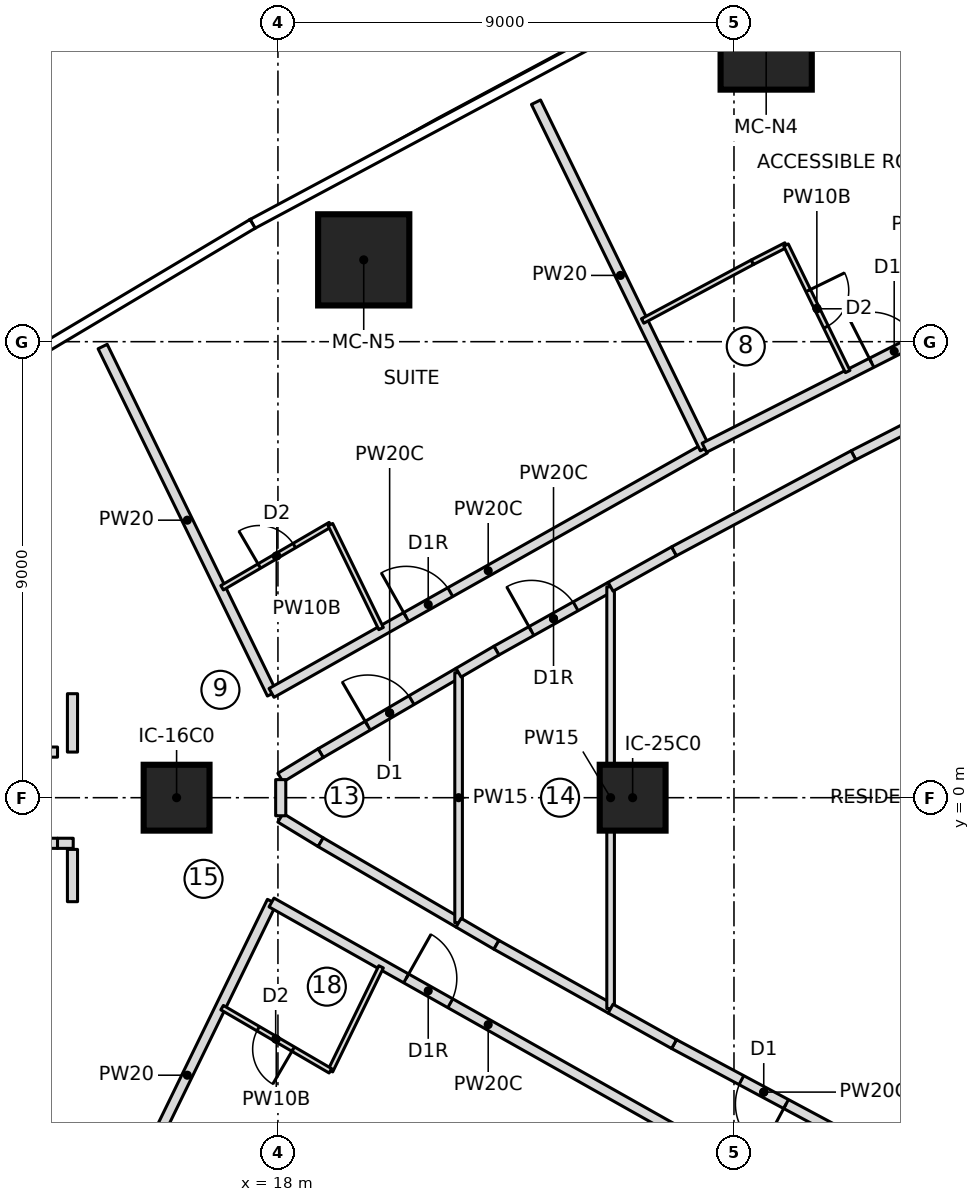
"""IFC4 building model, lengths in metres.
Left out: names, types, materials, properties, quantities, classifications, styles, units other than length and angle.
Written with IfcOpenShell. Run it as: python <this file> out.ifc"""

import sys

from ifc_helpers import new_model, si_unit, direction, frame, frame_2d, origin, origin_2d, place, context, subcontext, project, spatial, rectangle, extrude, element, fill, save


model = new_model("IFC4")
c1 = context("Model", 3, precision=1e-05, world=origin(), true_north=direction((0.0, 1.0)))
c2 = subcontext(c1, "Body", "Model", "MODEL_VIEW")
j1 = project(units=[si_unit("LENGTHUNIT", "METRE"), si_unit("PLANEANGLEUNIT", "RADIAN")], contexts=[c1])
p1 = place(None, origin())
s1 = spatial("IfcSite", under=j1, at=p1, CompositionType="ELEMENT")
p2 = place(p1, origin())
s2 = spatial("IfcBuilding", under=s1, at=p2, CompositionType="ELEMENT")
p3 = place(p2, frame((0.0, 0.0, 64.45)))
s3 = spatial("IfcBuildingStorey", under=s2, at=p3, CompositionType="ELEMENT", Elevation=64.45)
for number, where, z_axis, x_axis in (
    (1, (27.635, 14.874, 0.0), (0.0, 0.0, 1.0), (1.0, 0.0, 0.0)),
    (2, (19.693, 10.615, 0.0), (0.0, 0.0, 1.0), (1.0, 0.0, 0.0)),
):
    element("IfcColumn", number, at=place(p3, frame(where, z_axis=z_axis, x_axis=x_axis)), inside=s3, PredefinedType="COLUMN", context=c2, shape_type="SweptSolid", body=[
        extrude(rectangle(XDim=1.8, YDim=1.8, at=origin_2d()), origin(), (0.0, 0.0, 1.0), 3.55),
    ])
for number, where, z_axis, x_axis in (
    (3, (16.0, 0.0, 0.0), (0.0, 0.0, 1.0), (1.0, 0.0, 0.0)),
    (4, (25.0, 0.0, 0.0), (0.0, 0.0, 1.0), (1.0, 0.0, 0.0)),
):
    element("IfcColumn", number, at=place(p3, frame(where, z_axis=z_axis, x_axis=x_axis)), inside=s3, PredefinedType="COLUMN", context=c2, shape_type="SweptSolid", body=[
        extrude(rectangle(XDim=1.3, YDim=1.3, at=origin_2d()), origin(), (0.0, 0.0, 1.0), 3.55),
    ])
p4 = place(p3, frame((17.882, 2.05, 0.0), z_axis=(0.0, 0.0, 1.0), x_axis=(-0.438213564788, 0.898870887078, 0.0)))
e5 = element("IfcWall", 5, at=p4, inside=s3, PredefinedType="PARTITIONING", context=c2, shape_type="SweptSolid", body=[
    extrude(rectangle(XDim=7.625, YDim=0.2, at=frame_2d((3.813, 0.0))), origin(), (0.0, 0.0, 1.0), 3.25),
])
p5 = place(p3, frame((17.874, 2.068, 0.0), z_axis=(0.0, 0.0, 1.0), x_axis=(0.871078318876, 0.491144136057, 0.0)))
e6 = element("IfcWall", 6, at=p5, inside=s3, PredefinedType="PARTITIONING", context=c2, shape_type="SweptSolid", body=[
    extrude(rectangle(XDim=9.817, YDim=0.2, at=frame_2d((4.909, 0.0))), origin(), (0.0, 0.0, 1.0), 3.25),
])
p6 = place(p5, frame((3.05, 0.0, 0.0)))
e7 = element("IfcOpeningElement", 7, at=p6, cuts=e6, PredefinedType="OPENING", context=c2, shape_type="SweptSolid", body=[
    extrude(rectangle(XDim=1.0, YDim=2.1, at=frame_2d((0.5, 1.05))), frame((0.0, 0.11, 0.0), z_axis=(0.0, -1.0, 0.0), x_axis=(1.0, 0.0, 0.0)), (0.0, 0.0, 1.0), 0.22),
])
p7 = place(p3, frame((16.898, 4.144, 0.0), z_axis=(0.0, 0.0, 1.0), x_axis=(0.863707305865, 0.503993739837, 0.0)))
e8 = element("IfcWall", 8, at=p7, inside=s3, PredefinedType="PARTITIONING", context=c2, shape_type="SweptSolid", body=[
    extrude(rectangle(XDim=2.474, YDim=0.1, at=frame_2d((1.237, 0.0))), origin(), (0.0, 0.0, 1.0), 3.25),
])
p8 = place(p7, frame((0.85, 0.0, 0.0)))
e9 = element("IfcOpeningElement", 9, at=p8, cuts=e8, PredefinedType="OPENING", context=c2, shape_type="SweptSolid", body=[
    extrude(rectangle(XDim=0.8, YDim=2.1, at=frame_2d((0.4, 1.05))), frame((0.0, 0.06, 0.0), z_axis=(0.0, -1.0, 0.0), x_axis=(1.0, 0.0, 0.0)), (0.0, 0.0, 1.0), 0.12),
])
p9 = place(p3, frame((19.035, 5.39, 0.0), z_axis=(0.0, 0.0, 1.0), x_axis=(0.438122322582, -0.898915363344, 0.0)))
e10 = element("IfcWall", 10, at=p9, inside=s3, PredefinedType="PARTITIONING", context=c2, shape_type="SweptSolid", body=[
    extrude(rectangle(XDim=2.283, YDim=0.1, at=frame_2d((1.142, 0.0))), origin(), (0.0, 0.0, 1.0), 3.25),
])
p10 = place(p3, frame((26.425, 6.89, 0.0), z_axis=(0.0, 0.0, 1.0), x_axis=(-0.438202895602, 0.898876088394, 0.0)))
e11 = element("IfcWall", 11, at=p10, inside=s3, PredefinedType="PARTITIONING", context=c2, shape_type="SweptSolid", body=[
    extrude(rectangle(XDim=7.605, YDim=0.2, at=frame_2d((3.803, 0.0))), origin(), (0.0, 0.0, 1.0), 3.25),
])
p11 = place(p3, frame((26.417, 6.908, 0.0), z_axis=(0.0, 0.0, 1.0), x_axis=(0.891700643128, 0.452625632334, 0.0)))
e12 = element("IfcWall", 12, at=p11, inside=s3, PredefinedType="PARTITIONING", context=c2, shape_type="SweptSolid", body=[
    extrude(rectangle(XDim=9.801, YDim=0.2, at=frame_2d((4.901, 0.0))), origin(), (0.0, 0.0, 1.0), 3.25),
])
p12 = place(p11, frame((3.7, 0.0, 0.0)))
e13 = element("IfcOpeningElement", 13, at=p12, cuts=e12, PredefinedType="OPENING", context=c2, shape_type="SweptSolid", body=[
    extrude(rectangle(XDim=1.0, YDim=2.1, at=frame_2d((0.5, 1.05))), frame((0.0, 0.11, 0.0), z_axis=(0.0, -1.0, 0.0), x_axis=(1.0, 0.0, 0.0)), (0.0, 0.0, 1.0), 0.22),
])
p13 = place(p3, frame((25.198, 9.409, 0.0), z_axis=(0.0, 0.0, 1.0), x_axis=(0.881658684569, 0.471887660279, 0.0)))
e14 = element("IfcWall", 14, at=p13, inside=s3, PredefinedType="PARTITIONING", context=c2, shape_type="SweptSolid", body=[
    extrude(rectangle(XDim=2.457, YDim=0.1, at=frame_2d((1.228, 0.0))), origin(), (0.0, 0.0, 1.0), 3.25),
])
p14 = place(p3, frame((27.363, 10.568, 0.0), z_axis=(0.0, 0.0, 1.0), x_axis=(0.890195653003, 0.455578422858, 0.0)))
e15 = element("IfcWall", 15, at=p14, inside=s3, PredefinedType="PARTITIONING", context=c2, shape_type="SweptSolid", body=[
    extrude(rectangle(XDim=0.745, YDim=0.1, at=frame_2d((0.373, 0.0))), origin(), (0.0, 0.0, 1.0), 3.25),
])
p15 = place(p3, frame((28.027, 10.907, 0.0), z_axis=(0.0, 0.0, 1.0), x_axis=(0.438189818179, -0.898882463531, 0.0)))
e16 = element("IfcWall", 16, at=p15, inside=s3, PredefinedType="PARTITIONING", context=c2, shape_type="SweptSolid", body=[
    extrude(rectangle(XDim=2.777, YDim=0.1, at=frame_2d((1.389, 0.0))), origin(), (0.0, 0.0, 1.0), 3.25),
])
p16 = place(p15, frame((1.0, 0.0, 0.0)))
e17 = element("IfcOpeningElement", 17, at=p16, cuts=e16, PredefinedType="OPENING", context=c2, shape_type="SweptSolid", body=[
    extrude(rectangle(XDim=0.8, YDim=2.1, at=frame_2d((0.4, 1.05))), frame((0.0, 0.06, 0.0), z_axis=(0.0, -1.0, 0.0), x_axis=(1.0, 0.0, 0.0)), (0.0, 0.0, 1.0), 0.12),
])
p17 = place(p3, frame((14.541, -8.904, 0.0), z_axis=(0.0, 0.0, 1.0), x_axis=(0.438213564788, 0.898870887078, 0.0)))
e18 = element("IfcWall", 18, at=p17, inside=s3, PredefinedType="PARTITIONING", context=c2, shape_type="SweptSolid", body=[
    extrude(rectangle(XDim=7.625, YDim=0.2, at=frame_2d((3.813, 0.0))), origin(), (0.0, 0.0, 1.0), 3.25),
])
p18 = place(p3, frame((17.874, -2.068, 0.0), z_axis=(0.0, 0.0, 1.0), x_axis=(0.871078318876, -0.491144136057, 0.0)))
e19 = element("IfcWall", 19, at=p18, inside=s3, PredefinedType="PARTITIONING", context=c2, shape_type="SweptSolid", body=[
    extrude(rectangle(XDim=9.817, YDim=0.2, at=frame_2d((4.909, 0.0))), origin(), (0.0, 0.0, 1.0), 3.25),
])
p19 = place(p18, frame((3.05, 0.0, 0.0)))
e20 = element("IfcOpeningElement", 20, at=p19, cuts=e19, PredefinedType="OPENING", context=c2, shape_type="SweptSolid", body=[
    extrude(rectangle(XDim=1.0, YDim=2.1, at=frame_2d((0.5, 1.05))), frame((0.0, 0.11, 0.0), z_axis=(0.0, -1.0, 0.0), x_axis=(1.0, 0.0, 0.0)), (0.0, 0.0, 1.0), 0.22),
])
p20 = place(p3, frame((20.035, -3.338, 0.0), z_axis=(0.0, 0.0, 1.0), x_axis=(-0.438122322582, -0.898915363344, 0.0)))
e21 = element("IfcWall", 21, at=p20, inside=s3, PredefinedType="PARTITIONING", context=c2, shape_type="SweptSolid", body=[
    extrude(rectangle(XDim=2.283, YDim=0.1, at=frame_2d((1.142, 0.0))), origin(), (0.0, 0.0, 1.0), 3.25),
])
p21 = place(p3, frame((19.035, -5.39, 0.0), z_axis=(0.0, 0.0, 1.0), x_axis=(-0.863707305865, 0.503993739837, 0.0)))
e22 = element("IfcWall", 22, at=p21, inside=s3, PredefinedType="PARTITIONING", context=c2, shape_type="SweptSolid", body=[
    extrude(rectangle(XDim=2.474, YDim=0.1, at=frame_2d((1.237, 0.0))), origin(), (0.0, 0.0, 1.0), 3.25),
])
p22 = place(p21, frame((0.85, 0.0, 0.0)))
e23 = element("IfcOpeningElement", 23, at=p22, cuts=e22, PredefinedType="OPENING", context=c2, shape_type="SweptSolid", body=[
    extrude(rectangle(XDim=0.8, YDim=2.1, at=frame_2d((0.4, 1.05))), frame((0.0, 0.06, 0.0), z_axis=(0.0, -1.0, 0.0), x_axis=(1.0, 0.0, 0.0)), (0.0, 0.0, 1.0), 0.12),
])
p23 = place(p3, frame((18.844, 0.879, 0.0), z_axis=(0.0, 0.0, 1.0), x_axis=(0.86371145221, 0.503986634071, 0.0)))
e24 = element("IfcWall", 24, at=p23, inside=s3, PredefinedType="PARTITIONING", context=c2, shape_type="SweptSolid", body=[
    extrude(rectangle(XDim=3.151, YDim=0.2, at=frame_2d((1.576, 0.0))), origin(), (0.0, 0.0, 1.0), 3.25),
])
p24 = place(p23, frame((1.076, 0.0, 0.0)))
e25 = element("IfcOpeningElement", 25, at=p24, cuts=e24, PredefinedType="OPENING", context=c2, shape_type="SweptSolid", body=[
    extrude(rectangle(XDim=1.0, YDim=2.1, at=frame_2d((0.5, 1.05))), frame((0.0, 0.11, 0.0), z_axis=(0.0, -1.0, 0.0), x_axis=(1.0, 0.0, 0.0)), (0.0, 0.0, 1.0), 0.22),
])
for number, where, z_axis, x_axis in (
    (26, (18.844, -0.879, 0.0), (0.0, 0.0, 1.0), (-0.854, 0.52, 0.0)),
    (27, (18.05, 0.396, 0.0), (0.0, 0.0, 1.0), (0.854, 0.52, 0.0)),
):
    element("IfcWall", number, at=place(p3, frame(where, z_axis=z_axis, x_axis=x_axis)), inside=s3, PredefinedType="PARTITIONING", context=c2, shape_type="SweptSolid", body=[
        extrude(rectangle(XDim=0.929, YDim=0.2, at=frame_2d((0.464, 0.0))), origin(), (0.0, 0.0, 1.0), 3.25),
    ])
p25 = place(p3, frame((21.565, -2.467, 0.0), z_axis=(0.0, 0.0, 1.0), x_axis=(-0.86371145221, 0.503986634071, 0.0)))
e28 = element("IfcWall", 28, at=p25, inside=s3, PredefinedType="PARTITIONING", context=c2, shape_type="SweptSolid", body=[
    extrude(rectangle(XDim=3.151, YDim=0.2, at=frame_2d((1.576, 0.0))), origin(), (0.0, 0.0, 1.0), 3.25),
])
p26 = place(p3, frame((21.565, -2.467, 0.0), z_axis=(0.0, 0.0, 1.0), x_axis=(0.0, 1.0, 0.0)))
e29 = element("IfcWall", 29, at=p26, inside=s3, PredefinedType="PARTITIONING", context=c2, shape_type="SweptSolid", body=[
    extrude(rectangle(XDim=4.935, YDim=0.15, at=frame_2d((2.467, 0.0))), origin(), (0.0, 0.0, 1.0), 3.25),
])
p27 = place(p3, frame((22.312, 2.903, 0.0), z_axis=(0.0, 0.0, 1.0), x_axis=(0.872797752414, 0.488082045748, 0.0)))
e30 = element("IfcWall", 30, at=p27, inside=s3, PredefinedType="PARTITIONING", context=c2, shape_type="SweptSolid", body=[
    extrude(rectangle(XDim=2.582, YDim=0.2, at=frame_2d((1.291, 0.0))), origin(), (0.0, 0.0, 1.0), 3.25),
])
p28 = place(p27, frame((0.791, 0.0, 0.0)))
e31 = element("IfcOpeningElement", 31, at=p28, cuts=e30, PredefinedType="OPENING", context=c2, shape_type="SweptSolid", body=[
    extrude(rectangle(XDim=1.0, YDim=2.1, at=frame_2d((0.5, 1.05))), frame((0.0, 0.11, 0.0), z_axis=(0.0, -1.0, 0.0), x_axis=(1.0, 0.0, 0.0)), (0.0, 0.0, 1.0), 0.22),
])
for number, where, z_axis, x_axis in (
    (32, (22.312, -2.903, 0.0), (0.0, 0.0, 1.0), (-0.864, 0.504, 0.0)),
    (33, (21.565, 2.467, 0.0), (0.0, 0.0, 1.0), (0.864, 0.504, 0.0)),
):
    element("IfcWall", number, at=place(p3, frame(where, z_axis=z_axis, x_axis=x_axis)), inside=s3, PredefinedType="PARTITIONING", context=c2, shape_type="SweptSolid", body=[
        extrude(rectangle(XDim=0.865, YDim=0.2, at=frame_2d((0.432, 0.0))), origin(), (0.0, 0.0, 1.0), 3.25),
    ])
p29 = place(p3, frame((24.565, -4.163, 0.0), z_axis=(0.0, 0.0, 1.0), x_axis=(-0.872797752414, 0.488082045748, 0.0)))
e34 = element("IfcWall", 34, at=p29, inside=s3, PredefinedType="PARTITIONING", context=c2, shape_type="SweptSolid", body=[
    extrude(rectangle(XDim=2.582, YDim=0.2, at=frame_2d((1.291, 0.0))), origin(), (0.0, 0.0, 1.0), 3.25),
])
p30 = place(p3, frame((24.565, -4.163, 0.0), z_axis=(0.0, 0.0, 1.0), x_axis=(0.0, 1.0, 0.0)))
e35 = element("IfcWall", 35, at=p30, inside=s3, PredefinedType="PARTITIONING", context=c2, shape_type="SweptSolid", body=[
    extrude(rectangle(XDim=8.326, YDim=0.15, at=frame_2d((4.163, 0.0))), origin(), (0.0, 0.0, 1.0), 3.25),
])
p31 = place(p3, frame((29.357, -6.758, 0.0), z_axis=(0.0, 0.0, 1.0), x_axis=(-0.881655245922, 0.471894084874, 0.0)))
e36 = element("IfcWall", 36, at=p31, inside=s3, PredefinedType="PARTITIONING", context=c2, shape_type="SweptSolid", body=[
    extrude(rectangle(XDim=4.016, YDim=0.2, at=frame_2d((2.008, 0.0))), origin(), (0.0, 0.0, 1.0), 3.25),
])
p32 = place(p31, frame((1.508, 0.0, 0.0)))
e37 = element("IfcOpeningElement", 37, at=p32, cuts=e36, PredefinedType="OPENING", context=c2, shape_type="SweptSolid", body=[
    extrude(rectangle(XDim=1.0, YDim=2.1, at=frame_2d((0.5, 1.05))), frame((0.0, 0.11, 0.0), z_axis=(0.0, -1.0, 0.0), x_axis=(1.0, 0.0, 0.0)), (0.0, 0.0, 1.0), 0.22),
])
p33 = place(p3, frame((29.357, 6.758, 0.0), z_axis=(0.0, 0.0, 1.0), x_axis=(0.890213377055, 0.455543788579, 0.0)))
e38 = element("IfcWall", 38, at=p33, inside=s3, PredefinedType="PARTITIONING", context=c2, shape_type="SweptSolid", body=[
    extrude(rectangle(XDim=2.912, YDim=0.2, at=frame_2d((1.456, 0.0))), origin(), (0.0, 0.0, 1.0), 3.25),
])
for number, where, z_axis, x_axis in (
    (39, (25.817, -4.863, 0.0), (0.0, 0.0, 1.0), (-0.873, 0.488, 0.0)),
    (40, (24.565, 4.163, 0.0), (0.0, 0.0, 1.0), (0.873, 0.488, 0.0)),
):
    element("IfcWall", number, at=place(p3, frame(where, z_axis=z_axis, x_axis=x_axis)), inside=s3, PredefinedType="PARTITIONING", context=c2, shape_type="SweptSolid", body=[
        extrude(rectangle(XDim=1.434, YDim=0.2, at=frame_2d((0.717, 0.0))), origin(), (0.0, 0.0, 1.0), 3.25),
    ])
p34 = place(p3, frame((25.817, 4.863, 0.0), z_axis=(0.0, 0.0, 1.0), x_axis=(0.881655245922, 0.471894084874, 0.0)))
e41 = element("IfcWall", 41, at=p34, inside=s3, PredefinedType="PARTITIONING", context=c2, shape_type="SweptSolid", body=[
    extrude(rectangle(XDim=4.016, YDim=0.2, at=frame_2d((2.008, 0.0))), origin(), (0.0, 0.0, 1.0), 3.25),
])
p35 = place(p3, frame((4.977, 0.9, 0.0), z_axis=(0.0, 0.0, 1.0), x_axis=(1.0, 0.0, 0.0)))
e42 = element("IfcWall", 42, at=p35, inside=s3, PredefinedType="PARTITIONING", context=c2, shape_type="SweptSolid", body=[
    extrude(rectangle(XDim=8.673, YDim=0.2, at=frame_2d((4.336, 0.0))), origin(), (0.0, 0.0, 1.0), 3.25),
])
p36 = place(p35, frame((4.345, 0.0, 0.0)))
e43 = element("IfcOpeningElement", 43, at=p36, cuts=e42, PredefinedType="OPENING", context=c2, shape_type="SweptSolid", body=[
    extrude(rectangle(XDim=1.0, YDim=2.1, at=frame_2d((0.5, 1.05))), frame((0.0, 0.11, 0.0), z_axis=(0.0, -1.0, 0.0), x_axis=(1.0, 0.0, 0.0)), (0.0, 0.0, 1.0), 0.22),
])
p37 = place(p3, frame((4.977, -0.9, 0.0), z_axis=(0.0, 0.0, 1.0), x_axis=(1.0, 0.0, 0.0)))
e44 = element("IfcWall", 44, at=p37, inside=s3, PredefinedType="PARTITIONING", context=c2, shape_type="SweptSolid", body=[
    extrude(rectangle(XDim=8.673, YDim=0.2, at=frame_2d((4.336, 0.0))), origin(), (0.0, 0.0, 1.0), 3.25),
])
p38 = place(p37, frame((4.345, 0.0, 0.0)))
e45 = element("IfcOpeningElement", 45, at=p38, cuts=e44, PredefinedType="OPENING", context=c2, shape_type="SweptSolid", body=[
    extrude(rectangle(XDim=1.0, YDim=2.1, at=frame_2d((0.5, 1.05))), frame((0.0, 0.11, 0.0), z_axis=(0.0, -1.0, 0.0), x_axis=(1.0, 0.0, 0.0)), (0.0, 0.0, 1.0), 0.22),
])
p39 = place(p3, frame((18.055, -0.357, 0.0), z_axis=(0.0, 0.0, 1.0), x_axis=(0.0, 1.0, 0.0)))
e46 = element("IfcWall", 46, at=p39, inside=s3, PredefinedType="PARTITIONING", context=c2, shape_type="SweptSolid", body=[
    extrude(rectangle(XDim=0.713, YDim=0.2, at=frame_2d((0.357, 0.0))), origin(), (0.0, 0.0, 1.0), 3.25),
])
p40 = place(p3, frame((13.946, 2.052, 0.0), z_axis=(0.0, 0.0, 1.0), x_axis=(-0.000423818568, -0.999999910189, 0.0)))
e47 = element("IfcWall", 47, at=p40, inside=s3, PredefinedType="PARTITIONING", context=c2, shape_type="SweptSolid", body=[
    extrude(rectangle(XDim=1.152, YDim=0.2, at=frame_2d((0.576, 0.0))), origin(), (0.0, 0.0, 1.0), 3.25),
])
p41 = place(p3, frame((13.65, -0.9, 0.0), z_axis=(0.0, 0.0, 1.0), x_axis=(0.99999876, -0.001574801197, 0.0)))
e48 = element("IfcWall", 48, at=p41, inside=s3, PredefinedType="PARTITIONING", context=c2, shape_type="SweptSolid", body=[
    extrude(rectangle(XDim=0.31, YDim=0.2, at=frame_2d((0.155, 0.0))), origin(), (0.0, 0.0, 1.0), 3.25),
])
p42 = place(p3, frame((13.945, -1.021, 0.0), z_axis=(0.0, 0.0, 1.0), x_axis=(0.000473148752, -0.999999888065, 0.0)))
e49 = element("IfcWall", 49, at=p42, inside=s3, PredefinedType="PARTITIONING", context=c2, shape_type="SweptSolid", body=[
    extrude(rectangle(XDim=1.032, YDim=0.2, at=frame_2d((0.516, 0.0))), origin(), (0.0, 0.0, 1.0), 3.25),
])
p43 = place(p8, origin())
e50 = element("IfcDoor", 50, at=p43, inside=s3, OperationType="SINGLE_SWING_LEFT", PredefinedType="DOOR", context=c2, shape_type="SweptSolid", body=[
    extrude(rectangle(XDim=0.8, YDim=2.1, at=frame_2d((0.4, 1.05))), frame((0.0, 0.025, 0.0), z_axis=(0.0, -1.0, 0.0), x_axis=(1.0, 0.0, 0.0)), (0.0, 0.0, 1.0), 0.05),
])
fill(e9, e50)
p44 = place(p6, origin())
e51 = element("IfcDoor", 51, at=p44, inside=s3, OperationType="SINGLE_SWING_RIGHT", PredefinedType="DOOR", context=c2, shape_type="SweptSolid", body=[
    extrude(rectangle(XDim=1.0, YDim=2.1, at=frame_2d((0.5, 1.05))), frame((0.0, 0.025, 0.0), z_axis=(0.0, -1.0, 0.0), x_axis=(1.0, 0.0, 0.0)), (0.0, 0.0, 1.0), 0.05),
])
fill(e7, e51)
p45 = place(p16, origin())
e52 = element("IfcDoor", 52, at=p45, inside=s3, OperationType="SINGLE_SWING_LEFT", PredefinedType="DOOR", context=c2, shape_type="SweptSolid", body=[
    extrude(rectangle(XDim=0.8, YDim=2.1, at=frame_2d((0.4, 1.05))), frame((0.0, 0.025, 0.0), z_axis=(0.0, -1.0, 0.0), x_axis=(1.0, 0.0, 0.0)), (0.0, 0.0, 1.0), 0.05),
])
fill(e17, e52)
p46 = place(p12, origin())
e53 = element("IfcDoor", 53, at=p46, inside=s3, OperationType="SINGLE_SWING_RIGHT", PredefinedType="DOOR", context=c2, shape_type="SweptSolid", body=[
    extrude(rectangle(XDim=1.0, YDim=2.1, at=frame_2d((0.5, 1.05))), frame((0.0, 0.025, 0.0), z_axis=(0.0, -1.0, 0.0), x_axis=(1.0, 0.0, 0.0)), (0.0, 0.0, 1.0), 0.05),
])
fill(e13, e53)
p47 = place(p22, origin())
e54 = element("IfcDoor", 54, at=p47, inside=s3, OperationType="SINGLE_SWING_LEFT", PredefinedType="DOOR", context=c2, shape_type="SweptSolid", body=[
    extrude(rectangle(XDim=0.8, YDim=2.1, at=frame_2d((0.4, 1.05))), frame((0.0, 0.025, 0.0), z_axis=(0.0, -1.0, 0.0), x_axis=(1.0, 0.0, 0.0)), (0.0, 0.0, 1.0), 0.05),
])
fill(e23, e54)
p48 = place(p19, origin())
e55 = element("IfcDoor", 55, at=p48, inside=s3, OperationType="SINGLE_SWING_RIGHT", PredefinedType="DOOR", context=c2, shape_type="SweptSolid", body=[
    extrude(rectangle(XDim=1.0, YDim=2.1, at=frame_2d((0.5, 1.05))), frame((0.0, 0.025, 0.0), z_axis=(0.0, -1.0, 0.0), x_axis=(1.0, 0.0, 0.0)), (0.0, 0.0, 1.0), 0.05),
])
fill(e20, e55)
p49 = place(p24, origin())
e56 = element("IfcDoor", 56, at=p49, inside=s3, OperationType="SINGLE_SWING_LEFT", PredefinedType="DOOR", context=c2, shape_type="SweptSolid", body=[
    extrude(rectangle(XDim=1.0, YDim=2.1, at=frame_2d((0.5, 1.05))), frame((0.0, 0.025, 0.0), z_axis=(0.0, -1.0, 0.0), x_axis=(1.0, 0.0, 0.0)), (0.0, 0.0, 1.0), 0.05),
])
fill(e25, e56)
p50 = place(p28, origin())
e57 = element("IfcDoor", 57, at=p50, inside=s3, OperationType="SINGLE_SWING_RIGHT", PredefinedType="DOOR", context=c2, shape_type="SweptSolid", body=[
    extrude(rectangle(XDim=1.0, YDim=2.1, at=frame_2d((0.5, 1.05))), frame((0.0, 0.025, 0.0), z_axis=(0.0, -1.0, 0.0), x_axis=(1.0, 0.0, 0.0)), (0.0, 0.0, 1.0), 0.05),
])
fill(e31, e57)
p51 = place(p32, origin())
e58 = element("IfcDoor", 58, at=p51, inside=s3, OperationType="SINGLE_SWING_LEFT", PredefinedType="DOOR", context=c2, shape_type="SweptSolid", body=[
    extrude(rectangle(XDim=1.0, YDim=2.1, at=frame_2d((0.5, 1.05))), frame((0.0, 0.025, 0.0), z_axis=(0.0, -1.0, 0.0), x_axis=(1.0, 0.0, 0.0)), (0.0, 0.0, 1.0), 0.05),
])
fill(e37, e58)
save(model, sys.argv[1])
